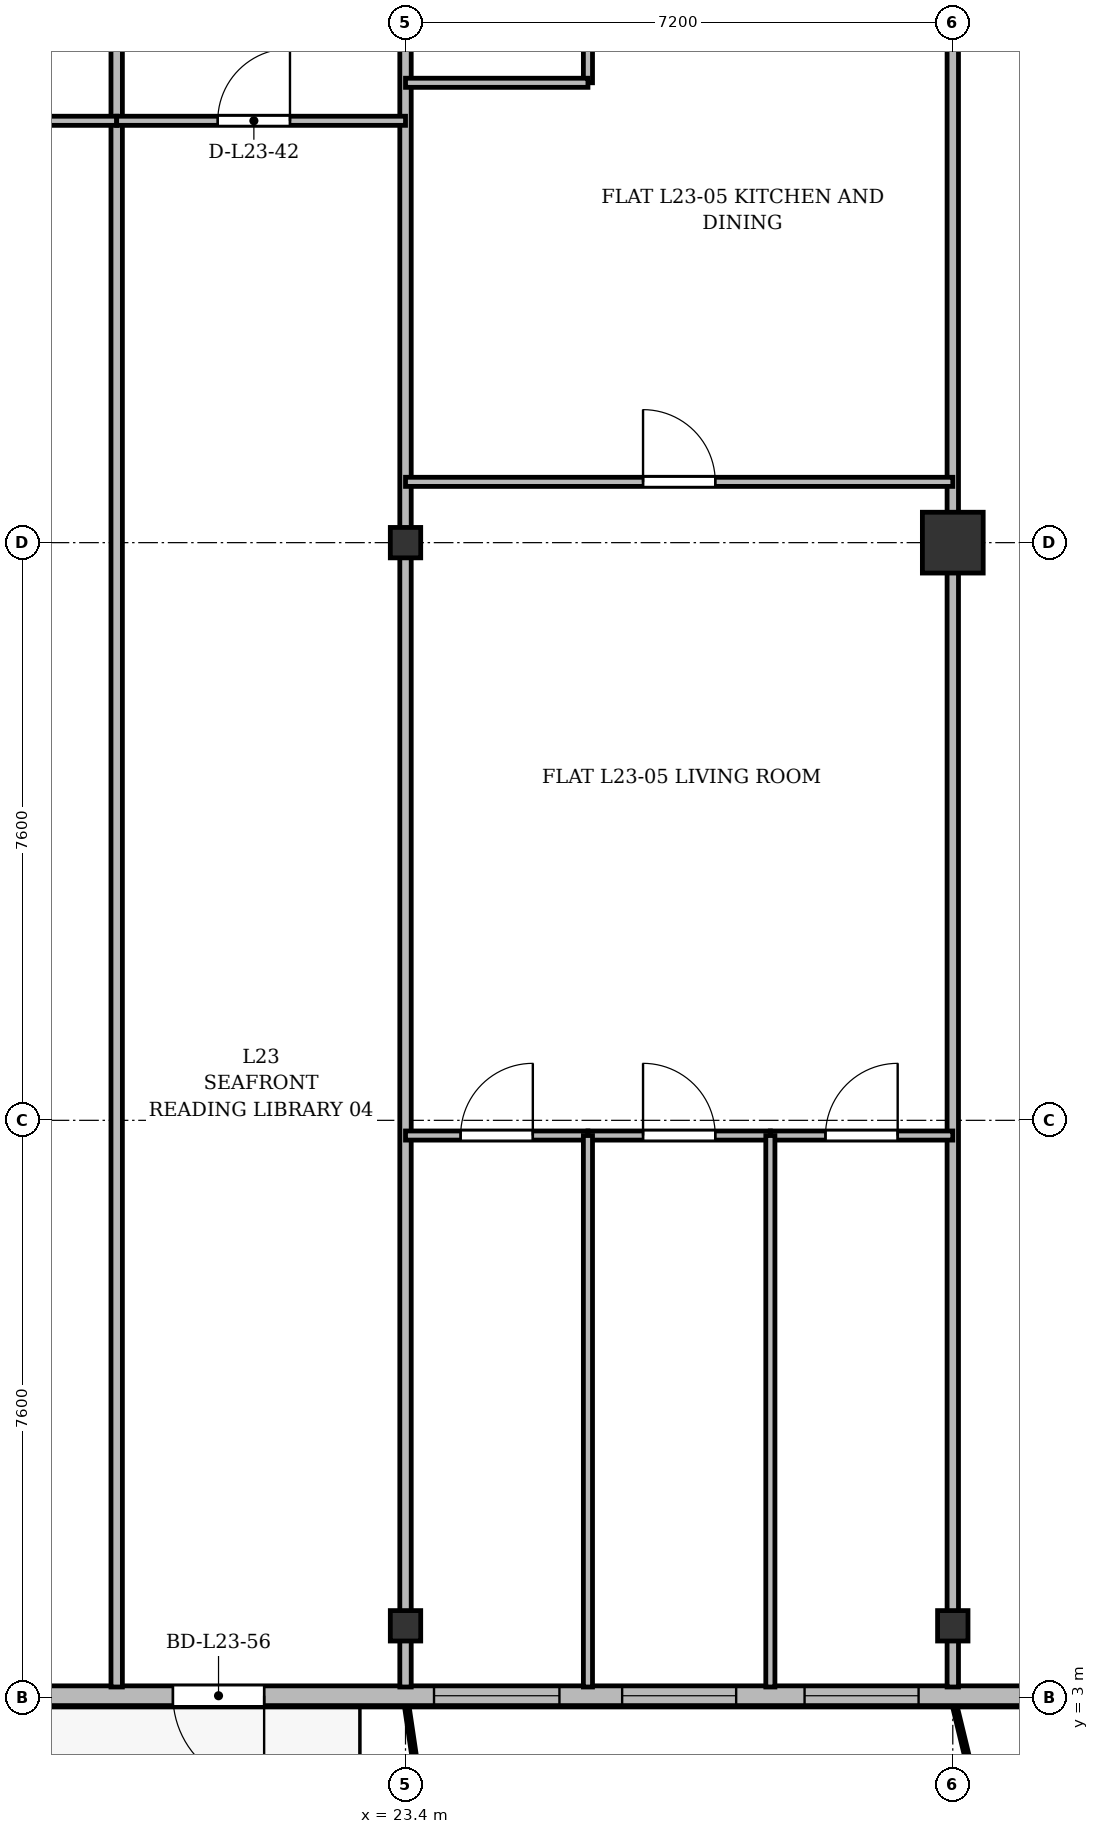
"""IFC4 building model, lengths in metres.
Left out: names, types, materials, properties, quantities, classifications, styles, units other than length and angle.
Written with IfcOpenShell. Run it as: python <this file> out.ifc"""

import sys

from ifc_helpers import new_model, si_unit, direction, frame, frame_2d, origin, origin_2d, place, context, subcontext, project, spatial, rectangle, i_section, extrude, source, transform, mapped, element, fill, save


model = new_model("IFC4")
c1 = context("Model", 3, precision=1e-05, world=origin(), true_north=direction((0.0, 1.0)))
c2 = subcontext(c1, "Body", "Model", "MODEL_VIEW")
j1 = project(units=[si_unit("LENGTHUNIT", "METRE"), si_unit("PLANEANGLEUNIT", "RADIAN")], contexts=[c1])
p1 = place(None, origin())
s1 = spatial("IfcSite", under=j1, at=p1, CompositionType="ELEMENT")
p2 = place(p1, origin())
s2 = spatial("IfcBuilding", under=s1, at=p2, CompositionType="ELEMENT")
p3 = place(p2, frame((0.0, 0.0, 92.5)))
s3 = spatial("IfcBuildingStorey", under=s2, at=p3, CompositionType="ELEMENT", Elevation=92.5)
m1 = source(origin(), c2, "Body", "SweptSolid", [
    extrude(i_section(OverallWidth=0.4, OverallDepth=0.4, WebThickness=0.022, FlangeThickness=0.035, at=origin_2d()), origin(), (0.0, 0.0, 1.0), 3.6),
])
for number, where, z_axis, x_axis in (
    (1, (23.4, 3.95, 0.0), (0.0, 0.0, 1.0), (1.0, 0.0, 0.0)),
    (2, (23.4, 18.2, 0.0), (0.0, 0.0, 1.0), (1.0, 0.0, 0.0)),
    (3, (30.6, 3.95, 0.0), (0.0, 0.0, 1.0), (1.0, 0.0, 0.0)),
):
    element("IfcColumn", number, at=place(p3, frame(where, z_axis=z_axis, x_axis=x_axis)), inside=s3, PredefinedType="COLUMN", context=c2, shape_type="MappedRepresentation", body=[
        mapped(m1, transform((0.0, 0.0, 0.0), x_axis=(1.0, 0.0, 0.0), y_axis=(0.0, 1.0, 0.0), z_axis=(0.0, 0.0, 1.0), scale=1.0)),
    ])
m2 = source(origin(), c2, "Body", "SweptSolid", [
    extrude(rectangle(XDim=0.8, YDim=0.8, at=origin_2d()), origin(), (0.0, 0.0, 1.0), 3.6),
])
p4 = place(p3, frame((30.6, 18.2, 0.0), z_axis=(0.0, 0.0, 1.0), x_axis=(1.0, 0.0, 0.0)))
e4 = element("IfcColumn", 4, at=p4, inside=s3, PredefinedType="COLUMN", context=c2, shape_type="MappedRepresentation", body=[
    mapped(m2, transform((0.0, 0.0, 0.0), x_axis=(1.0, 0.0, 0.0), y_axis=(0.0, 1.0, 0.0), z_axis=(0.0, 0.0, 1.0), scale=1.0)),
])
p5 = place(p3, frame((66.9, 3.03, 0.0), z_axis=(0.0, 0.0, 1.0), x_axis=(-1.0, 0.0, 0.0)))
e5 = element("IfcWall", 5, at=p5, inside=s3, PredefinedType="SOLIDWALL", context=c2, shape_type="SweptSolid", body=[
    extrude(rectangle(XDim=59.4, YDim=0.26, at=frame_2d((29.7, 0.0))), origin(), (0.0, 0.0, 1.0), 3.34),
])
p6 = place(p5, frame((2.175, 0.0, 0.9)))
e6 = element("IfcOpeningElement", 6, at=p6, cuts=e5, PredefinedType="OPENING", context=c2, shape_type="SweptSolid", body=[
    extrude(rectangle(XDim=1.65, YDim=1.85, at=frame_2d((0.825, 0.925))), frame((0.0, 0.14, 0.0), z_axis=(0.0, -1.0, 0.0), x_axis=(1.0, 0.0, 0.0)), (0.0, 0.0, 1.0), 0.28),
])
p7 = place(p5, frame((5.5, 0.0, 0.9)))
e7 = element("IfcOpeningElement", 7, at=p7, cuts=e5, PredefinedType="OPENING", context=c2, shape_type="SweptSolid", body=[
    extrude(rectangle(XDim=1.8, YDim=1.8, at=frame_2d((0.9, 0.9))), frame((0.0, 0.14, 0.0), z_axis=(0.0, -1.0, 0.0), x_axis=(1.0, 0.0, 0.0)), (0.0, 0.0, 1.0), 0.28),
])
p8 = place(p5, frame((8.65, 0.0, 0.9)))
e8 = element("IfcOpeningElement", 8, at=p8, cuts=e5, PredefinedType="OPENING", context=c2, shape_type="SweptSolid", body=[
    extrude(rectangle(XDim=1.5, YDim=1.75, at=frame_2d((0.75, 0.875))), frame((0.0, 0.14, 0.0), z_axis=(0.0, -1.0, 0.0), x_axis=(1.0, 0.0, 0.0)), (0.0, 0.0, 1.0), 0.28),
])
p9 = place(p5, frame((11.25, 0.0, 0.9)))
e9 = element("IfcOpeningElement", 9, at=p9, cuts=e5, PredefinedType="OPENING", context=c2, shape_type="SweptSolid", body=[
    extrude(rectangle(XDim=1.5, YDim=1.75, at=frame_2d((0.75, 0.875))), frame((0.0, 0.14, 0.0), z_axis=(0.0, -1.0, 0.0), x_axis=(1.0, 0.0, 0.0)), (0.0, 0.0, 1.0), 0.28),
])
p10 = place(p5, frame((13.6, 0.0, 0.9)))
e10 = element("IfcOpeningElement", 10, at=p10, cuts=e5, PredefinedType="OPENING", context=c2, shape_type="SweptSolid", body=[
    extrude(rectangle(XDim=2.0, YDim=1.95, at=frame_2d((1.0, 0.975))), frame((0.0, 0.14, 0.0), z_axis=(0.0, -1.0, 0.0), x_axis=(1.0, 0.0, 0.0)), (0.0, 0.0, 1.0), 0.28),
])
p11 = place(p5, frame((16.775, 0.0, 0.9)))
e11 = element("IfcOpeningElement", 11, at=p11, cuts=e5, PredefinedType="OPENING", context=c2, shape_type="SweptSolid", body=[
    extrude(rectangle(XDim=1.65, YDim=1.85, at=frame_2d((0.825, 0.925))), frame((0.0, 0.14, 0.0), z_axis=(0.0, -1.0, 0.0), x_axis=(1.0, 0.0, 0.0)), (0.0, 0.0, 1.0), 0.28),
])
p12 = place(p5, frame((20.227, 0.0, 0.0)))
e12 = element("IfcOpeningElement", 12, at=p12, cuts=e5, PredefinedType="OPENING", context=c2, shape_type="SweptSolid", body=[
    extrude(rectangle(XDim=1.2, YDim=2.2, at=frame_2d((0.6, 1.1))), frame((0.0, 0.14, 0.0), z_axis=(0.0, -1.0, 0.0), x_axis=(1.0, 0.0, 0.0)), (0.0, 0.0, 1.0), 0.28),
])
p13 = place(p5, frame((28.6, 0.0, 0.9)))
e13 = element("IfcOpeningElement", 13, at=p13, cuts=e5, PredefinedType="OPENING", context=c2, shape_type="SweptSolid", body=[
    extrude(rectangle(XDim=2.2, YDim=1.8, at=frame_2d((1.1, 0.9))), frame((0.0, 0.14, 0.0), z_axis=(0.0, -1.0, 0.0), x_axis=(1.0, 0.0, 0.0)), (0.0, 0.0, 1.0), 0.28),
])
p14 = place(p5, frame((36.75, 0.0, 0.9)))
e14 = element("IfcOpeningElement", 14, at=p14, cuts=e5, PredefinedType="OPENING", context=c2, shape_type="SweptSolid", body=[
    extrude(rectangle(XDim=1.5, YDim=1.75, at=frame_2d((0.75, 0.875))), frame((0.0, 0.14, 0.0), z_axis=(0.0, -1.0, 0.0), x_axis=(1.0, 0.0, 0.0)), (0.0, 0.0, 1.0), 0.28),
])
p15 = place(p5, frame((39.15, 0.0, 0.9)))
e15 = element("IfcOpeningElement", 15, at=p15, cuts=e5, PredefinedType="OPENING", context=c2, shape_type="SweptSolid", body=[
    extrude(rectangle(XDim=1.5, YDim=1.75, at=frame_2d((0.75, 0.875))), frame((0.0, 0.14, 0.0), z_axis=(0.0, -1.0, 0.0), x_axis=(1.0, 0.0, 0.0)), (0.0, 0.0, 1.0), 0.28),
])
p16 = place(p5, frame((41.475, 0.0, 0.9)))
e16 = element("IfcOpeningElement", 16, at=p16, cuts=e5, PredefinedType="OPENING", context=c2, shape_type="SweptSolid", body=[
    extrude(rectangle(XDim=1.65, YDim=1.85, at=frame_2d((0.825, 0.925))), frame((0.0, 0.14, 0.0), z_axis=(0.0, -1.0, 0.0), x_axis=(1.0, 0.0, 0.0)), (0.0, 0.0, 1.0), 0.28),
])
p17 = place(p5, frame((45.36, 0.0, 0.0)))
e17 = element("IfcOpeningElement", 17, at=p17, cuts=e5, PredefinedType="OPENING", context=c2, shape_type="SweptSolid", body=[
    extrude(rectangle(XDim=1.2, YDim=2.2, at=frame_2d((0.6, 1.1))), frame((0.0, 0.14, 0.0), z_axis=(0.0, -1.0, 0.0), x_axis=(1.0, 0.0, 0.0)), (0.0, 0.0, 1.0), 0.28),
])
p18 = place(p5, frame((48.2, 0.0, 0.9)))
e18 = element("IfcOpeningElement", 18, at=p18, cuts=e5, PredefinedType="OPENING", context=c2, shape_type="SweptSolid", body=[
    extrude(rectangle(XDim=2.2, YDim=1.8, at=frame_2d((1.1, 0.9))), frame((0.0, 0.14, 0.0), z_axis=(0.0, -1.0, 0.0), x_axis=(1.0, 0.0, 0.0)), (0.0, 0.0, 1.0), 0.28),
])
p19 = place(p5, frame((52.25, 0.0, 0.9)))
e19 = element("IfcOpeningElement", 19, at=p19, cuts=e5, PredefinedType="OPENING", context=c2, shape_type="SweptSolid", body=[
    extrude(rectangle(XDim=1.5, YDim=1.75, at=frame_2d((0.75, 0.875))), frame((0.0, 0.14, 0.0), z_axis=(0.0, -1.0, 0.0), x_axis=(1.0, 0.0, 0.0)), (0.0, 0.0, 1.0), 0.28),
])
p20 = place(p5, frame((55.4, 0.0, 0.9)))
e20 = element("IfcOpeningElement", 20, at=p20, cuts=e5, PredefinedType="OPENING", context=c2, shape_type="SweptSolid", body=[
    extrude(rectangle(XDim=2.0, YDim=1.95, at=frame_2d((1.0, 0.975))), frame((0.0, 0.14, 0.0), z_axis=(0.0, -1.0, 0.0), x_axis=(1.0, 0.0, 0.0)), (0.0, 0.0, 1.0), 0.28),
])
p21 = place(p3, frame((19.6, 3.145, 0.0), z_axis=(0.0, 0.0, 1.0), x_axis=(0.0, 1.0, 0.0)))
e21 = element("IfcWall", 21, at=p21, inside=s3, PredefinedType="PARTITIONING", context=c2, shape_type="SweptSolid", body=[
    extrude(rectangle(XDim=24.455, YDim=0.15, at=frame_2d((12.228, 0.0))), origin(), (0.0, 0.0, 1.0), 2.752),
])
for number, where, z_axis, x_axis in (
    (22, (23.4, 3.145, 0.0), (0.0, 0.0, 1.0), (0.0, 1.0, 0.0)),
    (23, (30.6, 3.145, 0.0), (0.0, 0.0, 1.0), (0.0, 1.0, 0.0)),
):
    element("IfcWall", number, at=place(p3, frame(where, z_axis=z_axis, x_axis=x_axis)), inside=s3, PredefinedType="PARTITIONING", context=c2, shape_type="SweptSolid", body=[
        extrude(rectangle(XDim=24.455, YDim=0.15, at=frame_2d((12.228, 0.0))), origin(), (0.0, 0.0, 1.0), 2.84),
    ])
p22 = place(p3, frame((15.6, 23.75, 0.0), z_axis=(0.0, 0.0, 1.0), x_axis=(1.0, 0.0, 0.0)))
e24 = element("IfcWall", 24, at=p22, inside=s3, PredefinedType="PARTITIONING", context=c2, shape_type="SweptSolid", body=[
    extrude(rectangle(XDim=4.0, YDim=0.12, at=frame_2d((2.0, 0.0))), origin(), (0.0, 0.0, 1.0), 2.84),
])
p23 = place(p22, frame((1.525, 0.0, 0.0)))
e25 = element("IfcOpeningElement", 25, at=p23, cuts=e24, PredefinedType="OPENING", context=c2, shape_type="SweptSolid", body=[
    extrude(rectangle(XDim=0.95, YDim=2.15, at=frame_2d((0.475, 1.075))), frame((0.0, 0.07, 0.0), z_axis=(0.0, -1.0, 0.0), x_axis=(1.0, 0.0, 0.0)), (0.0, 0.0, 1.0), 0.14),
])
p24 = place(p3, frame((19.6, 23.75, 0.0), z_axis=(0.0, 0.0, 1.0), x_axis=(1.0, 0.0, 0.0)))
e26 = element("IfcWall", 26, at=p24, inside=s3, PredefinedType="PARTITIONING", context=c2, shape_type="SweptSolid", body=[
    extrude(rectangle(XDim=3.8, YDim=0.12, at=frame_2d((1.9, 0.0))), origin(), (0.0, 0.0, 1.0), 2.84),
])
p25 = place(p24, frame((1.33, 0.0, 0.0)))
e27 = element("IfcOpeningElement", 27, at=p25, cuts=e26, PredefinedType="OPENING", context=c2, shape_type="SweptSolid", body=[
    extrude(rectangle(XDim=0.95, YDim=2.15, at=frame_2d((0.475, 1.075))), frame((0.0, 0.07, 0.0), z_axis=(0.0, -1.0, 0.0), x_axis=(1.0, 0.0, 0.0)), (0.0, 0.0, 1.0), 0.14),
])
p26 = place(p3, frame((23.4, 19.0, 0.0), z_axis=(0.0, 0.0, 1.0), x_axis=(1.0, 0.0, 0.0)))
e28 = element("IfcWall", 28, at=p26, inside=s3, PredefinedType="PARTITIONING", context=c2, shape_type="SweptSolid", body=[
    extrude(rectangle(XDim=7.2, YDim=0.12, at=frame_2d((3.6, 0.0))), origin(), (0.0, 0.0, 1.0), 2.84),
])
p27 = place(p26, frame((3.125, 0.0, 0.0)))
e29 = element("IfcOpeningElement", 29, at=p27, cuts=e28, PredefinedType="OPENING", context=c2, shape_type="SweptSolid", body=[
    extrude(rectangle(XDim=0.95, YDim=2.15, at=frame_2d((0.475, 1.075))), frame((0.0, 0.07, 0.0), z_axis=(0.0, -1.0, 0.0), x_axis=(1.0, 0.0, 0.0)), (0.0, 0.0, 1.0), 0.14),
])
p28 = place(p3, frame((25.8, 24.25, 0.0), z_axis=(0.0, 0.0, 1.0), x_axis=(0.0, 1.0, 0.0)))
e30 = element("IfcWall", 30, at=p28, inside=s3, PredefinedType="PARTITIONING", context=c2, shape_type="SweptSolid", body=[
    extrude(rectangle(XDim=3.35, YDim=0.12, at=frame_2d((1.675, 0.0))), origin(), (0.0, 0.0, 1.0), 2.99),
])
p29 = place(p28, frame((0.8, 0.0, 0.0)))
e31 = element("IfcOpeningElement", 31, at=p29, cuts=e30, PredefinedType="OPENING", context=c2, shape_type="SweptSolid", body=[
    extrude(rectangle(XDim=0.85, YDim=2.1, at=frame_2d((0.425, 1.05))), frame((0.0, 0.07, 0.0), z_axis=(0.0, -1.0, 0.0), x_axis=(1.0, 0.0, 0.0)), (0.0, 0.0, 1.0), 0.14),
])
p30 = place(p3, frame((23.4, 24.25, 0.0), z_axis=(0.0, 0.0, 1.0), x_axis=(1.0, 0.0, 0.0)))
e32 = element("IfcWall", 32, at=p30, inside=s3, PredefinedType="PARTITIONING", context=c2, shape_type="SweptSolid", body=[
    extrude(rectangle(XDim=2.4, YDim=0.12, at=frame_2d((1.2, 0.0))), origin(), (0.0, 0.0, 1.0), 2.84),
])
p31 = place(p3, frame((23.4, 10.4, 0.0), z_axis=(0.0, 0.0, 1.0), x_axis=(1.0, 0.0, 0.0)))
e33 = element("IfcWall", 33, at=p31, inside=s3, PredefinedType="PARTITIONING", context=c2, shape_type="SweptSolid", body=[
    extrude(rectangle(XDim=2.4, YDim=0.12, at=frame_2d((1.2, 0.0))), origin(), (0.0, 0.0, 1.0), 2.84),
])
p32 = place(p31, frame((0.725, 0.0, 0.0)))
e34 = element("IfcOpeningElement", 34, at=p32, cuts=e33, PredefinedType="OPENING", context=c2, shape_type="SweptSolid", body=[
    extrude(rectangle(XDim=0.95, YDim=2.15, at=frame_2d((0.475, 1.075))), frame((0.0, 0.07, 0.0), z_axis=(0.0, -1.0, 0.0), x_axis=(1.0, 0.0, 0.0)), (0.0, 0.0, 1.0), 0.14),
])
p33 = place(p3, frame((25.8, 10.4, 0.0), z_axis=(0.0, 0.0, 1.0), x_axis=(1.0, 0.0, 0.0)))
e35 = element("IfcWall", 35, at=p33, inside=s3, PredefinedType="PARTITIONING", context=c2, shape_type="SweptSolid", body=[
    extrude(rectangle(XDim=2.4, YDim=0.12, at=frame_2d((1.2, 0.0))), origin(), (0.0, 0.0, 1.0), 3.34),
])
p34 = place(p33, frame((0.725, 0.0, 0.0)))
e36 = element("IfcOpeningElement", 36, at=p34, cuts=e35, PredefinedType="OPENING", context=c2, shape_type="SweptSolid", body=[
    extrude(rectangle(XDim=0.95, YDim=2.15, at=frame_2d((0.475, 1.075))), frame((0.0, 0.07, 0.0), z_axis=(0.0, -1.0, 0.0), x_axis=(1.0, 0.0, 0.0)), (0.0, 0.0, 1.0), 0.14),
])
p35 = place(p3, frame((25.8, 3.145, 0.0), z_axis=(0.0, 0.0, 1.0), x_axis=(0.0, 1.0, 0.0)))
e37 = element("IfcWall", 37, at=p35, inside=s3, PredefinedType="PARTITIONING", context=c2, shape_type="SweptSolid", body=[
    extrude(rectangle(XDim=7.255, YDim=0.12, at=frame_2d((3.627, 0.0))), origin(), (0.0, 0.0, 1.0), 2.752),
])
p36 = place(p3, frame((28.2, 10.4, 0.0), z_axis=(0.0, 0.0, 1.0), x_axis=(1.0, 0.0, 0.0)))
e38 = element("IfcWall", 38, at=p36, inside=s3, PredefinedType="PARTITIONING", context=c2, shape_type="SweptSolid", body=[
    extrude(rectangle(XDim=2.4, YDim=0.12, at=frame_2d((1.2, 0.0))), origin(), (0.0, 0.0, 1.0), 2.84),
])
p37 = place(p36, frame((0.725, 0.0, 0.0)))
e39 = element("IfcOpeningElement", 39, at=p37, cuts=e38, PredefinedType="OPENING", context=c2, shape_type="SweptSolid", body=[
    extrude(rectangle(XDim=0.95, YDim=2.15, at=frame_2d((0.475, 1.075))), frame((0.0, 0.07, 0.0), z_axis=(0.0, -1.0, 0.0), x_axis=(1.0, 0.0, 0.0)), (0.0, 0.0, 1.0), 0.14),
])
p38 = place(p3, frame((28.2, 3.145, 0.0), z_axis=(0.0, 0.0, 1.0), x_axis=(0.0, 1.0, 0.0)))
e40 = element("IfcWall", 40, at=p38, inside=s3, PredefinedType="PARTITIONING", context=c2, shape_type="SweptSolid", body=[
    extrude(rectangle(XDim=7.255, YDim=0.12, at=frame_2d((3.627, 0.0))), origin(), (0.0, 0.0, 1.0), 2.752),
])
m3 = source(origin(), c2, "Body", "SweptSolid", [
    extrude(rectangle(XDim=1.5, YDim=1.75, at=frame_2d((0.75, 0.875))), frame((0.0, 0.03, 0.0), z_axis=(0.0, -1.0, 0.0), x_axis=(1.0, 0.0, 0.0)), (0.0, 0.0, 1.0), 0.06),
])
p39 = place(p14, origin())
e41 = element("IfcWindow", 41, at=p39, inside=s3, PartitioningType="SINGLE_PANEL", PredefinedType="WINDOW", context=c2, shape_type="MappedRepresentation", body=[
    mapped(m3, transform((0.0, 0.0, 0.0), x_axis=(1.0, 0.0, 0.0), y_axis=(0.0, 1.0, 0.0), z_axis=(0.0, 0.0, 1.0), scale=1.0)),
])
fill(e14, e41)
p40 = place(p15, origin())
e42 = element("IfcWindow", 42, at=p40, inside=s3, PartitioningType="SINGLE_PANEL", PredefinedType="WINDOW", context=c2, shape_type="MappedRepresentation", body=[
    mapped(m3, transform((0.0, 0.0, 0.0), x_axis=(1.0, 0.0, 0.0), y_axis=(0.0, 1.0, 0.0), z_axis=(0.0, 0.0, 1.0), scale=1.0)),
])
fill(e15, e42)
m4 = source(origin(), c2, "Body", "SweptSolid", [
    extrude(rectangle(XDim=1.65, YDim=1.85, at=frame_2d((0.825, 0.925))), frame((0.0, 0.03, 0.0), z_axis=(0.0, -1.0, 0.0), x_axis=(1.0, 0.0, 0.0)), (0.0, 0.0, 1.0), 0.06),
])
p41 = place(p16, origin())
e43 = element("IfcWindow", 43, at=p41, inside=s3, PartitioningType="SINGLE_PANEL", PredefinedType="WINDOW", context=c2, shape_type="MappedRepresentation", body=[
    mapped(m4, transform((0.0, 0.0, 0.0), x_axis=(1.0, 0.0, 0.0), y_axis=(0.0, 1.0, 0.0), z_axis=(0.0, 0.0, 1.0), scale=1.0)),
])
fill(e16, e43)
m5 = source(origin(), c2, "Body", "SweptSolid", [
    extrude(rectangle(XDim=1.2, YDim=2.2, at=frame_2d((0.6, 1.1))), frame((0.0, 0.025, 0.0), z_axis=(0.0, -1.0, 0.0), x_axis=(1.0, 0.0, 0.0)), (0.0, 0.0, 1.0), 0.05),
])
p42 = place(p17, origin())
e44 = element("IfcDoor", 44, at=p42, inside=s3, OperationType="SINGLE_SWING_LEFT", PredefinedType="DOOR", context=c2, shape_type="MappedRepresentation", body=[
    mapped(m5, transform((0.0, 0.0, 0.0), x_axis=(1.0, 0.0, 0.0), y_axis=(0.0, 1.0, 0.0), z_axis=(0.0, 0.0, 1.0), scale=1.0)),
])
fill(e17, e44)
m6 = source(origin(), c2, "Body", "SweptSolid", [
    extrude(rectangle(XDim=0.95, YDim=2.15, at=frame_2d((0.475, 1.075))), frame((0.0, 0.025, 0.0), z_axis=(0.0, -1.0, 0.0), x_axis=(1.0, 0.0, 0.0)), (0.0, 0.0, 1.0), 0.05),
])
p43 = place(p25, origin())
e45 = element("IfcDoor", 45, at=p43, inside=s3, OperationType="SINGLE_SWING_RIGHT", PredefinedType="DOOR", context=c2, shape_type="MappedRepresentation", body=[
    mapped(m6, transform((0.0, 0.0, 0.0), x_axis=(1.0, 0.0, 0.0), y_axis=(0.0, 1.0, 0.0), z_axis=(0.0, 0.0, 1.0), scale=1.0)),
])
fill(e27, e45)
p44 = place(p27, origin())
e46 = element("IfcDoor", 46, at=p44, inside=s3, OperationType="SINGLE_SWING_LEFT", PredefinedType="DOOR", context=c2, shape_type="MappedRepresentation", body=[
    mapped(m6, transform((0.0, 0.0, 0.0), x_axis=(1.0, 0.0, 0.0), y_axis=(0.0, 1.0, 0.0), z_axis=(0.0, 0.0, 1.0), scale=1.0)),
])
fill(e29, e46)
p45 = place(p32, origin())
e47 = element("IfcDoor", 47, at=p45, inside=s3, OperationType="SINGLE_SWING_RIGHT", PredefinedType="DOOR", context=c2, shape_type="MappedRepresentation", body=[
    mapped(m6, transform((0.0, 0.0, 0.0), x_axis=(1.0, 0.0, 0.0), y_axis=(0.0, 1.0, 0.0), z_axis=(0.0, 0.0, 1.0), scale=1.0)),
])
fill(e34, e47)
p46 = place(p34, origin())
e48 = element("IfcDoor", 48, at=p46, inside=s3, OperationType="SINGLE_SWING_LEFT", PredefinedType="DOOR", context=c2, shape_type="MappedRepresentation", body=[
    mapped(m6, transform((0.0, 0.0, 0.0), x_axis=(1.0, 0.0, 0.0), y_axis=(0.0, 1.0, 0.0), z_axis=(0.0, 0.0, 1.0), scale=1.0)),
])
fill(e36, e48)
p47 = place(p37, origin())
e49 = element("IfcDoor", 49, at=p47, inside=s3, OperationType="SINGLE_SWING_RIGHT", PredefinedType="DOOR", context=c2, shape_type="MappedRepresentation", body=[
    mapped(m6, transform((0.0, 0.0, 0.0), x_axis=(1.0, 0.0, 0.0), y_axis=(0.0, 1.0, 0.0), z_axis=(0.0, 0.0, 1.0), scale=1.0)),
])
fill(e39, e49)
save(model, sys.argv[1])
